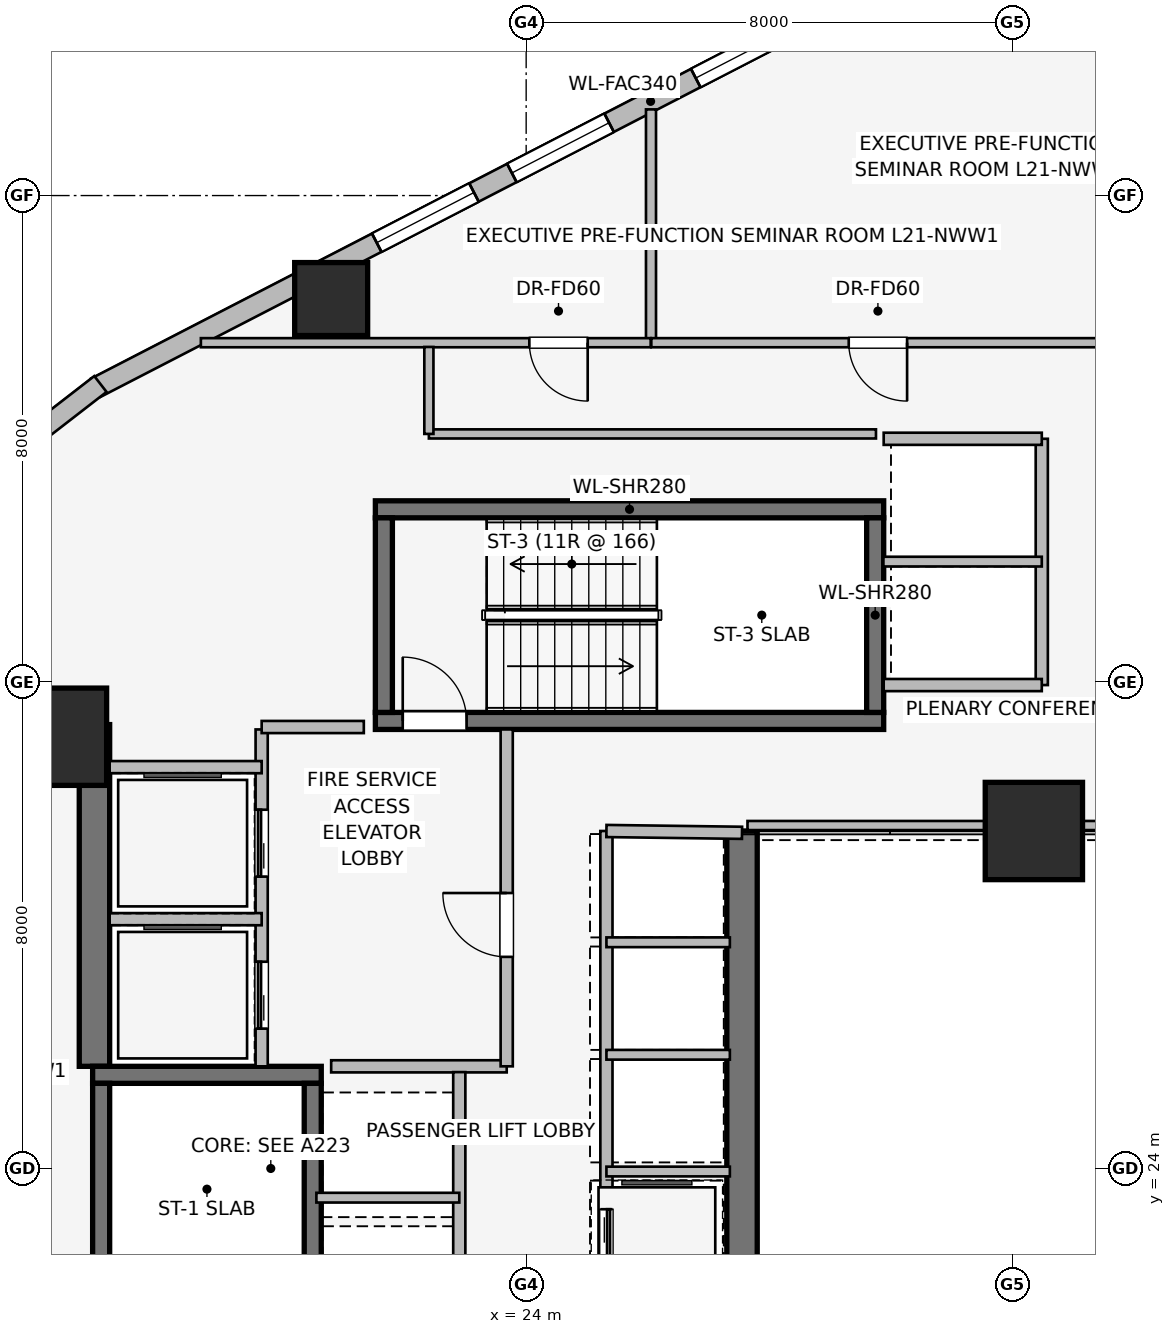
"""IFC4 building model, lengths in metres.
Left out: names, types, materials, properties, quantities, classifications, styles, units other than length and angle.
Written with IfcOpenShell. Run it as: python <this file> out.ifc"""

import sys

from ifc_helpers import new_model, si_unit, direction, frame, frame_2d, origin, origin_2d, place, context, subcontext, project, spatial, rectangle, extrude, element, fill, save


model = new_model("IFC4")
c1 = context("Model", 3, precision=1e-05, world=origin(), true_north=direction((0.0, 1.0)))
c2 = subcontext(c1, "Body", "Model", "MODEL_VIEW")
j1 = project(units=[si_unit("LENGTHUNIT", "METRE"), si_unit("PLANEANGLEUNIT", "RADIAN")], contexts=[c1])
p1 = place(None, origin())
s1 = spatial("IfcSite", under=j1, at=p1, CompositionType="ELEMENT")
p2 = place(p1, origin())
s2 = spatial("IfcBuilding", under=s1, at=p2, CompositionType="ELEMENT")
p3 = place(p2, frame((0.0, 0.0, 81.75)))
s3 = spatial("IfcBuildingStorey", under=s2, at=p3, CompositionType="ELEMENT", Elevation=81.75)
p4 = place(p3, frame((16.9, 25.68, 0.0), z_axis=(0.0, 0.0, 1.0), x_axis=(0.0, 1.0, 0.0)))
e1 = element("IfcWall", 1, at=p4, inside=s3, PredefinedType="SHEAR", context=c2, shape_type="SweptSolid", body=[
    extrude(rectangle(XDim=5.62, YDim=0.5, at=frame_2d((2.81, 0.0))), origin(), (0.0, 0.0, 1.0), 3.65),
])
p5 = place(p3, frame((27.55, 29.55, 0.0), z_axis=(0.0, 0.0, 1.0), x_axis=(0.0, -1.0, 0.0)))
e2 = element("IfcWall", 2, at=p5, inside=s3, PredefinedType="SHEAR", context=c2, shape_type="SweptSolid", body=[
    extrude(rectangle(XDim=11.25, YDim=0.5, at=frame_2d((5.625, 0.0))), origin(), (0.0, 0.0, 1.0), 3.65),
])
p6 = place(p3, frame((20.63, 25.54, 0.0), z_axis=(0.0, 0.0, 1.0), x_axis=(-1.0, 0.0, 0.0)))
e3 = element("IfcWall", 3, at=p6, inside=s3, PredefinedType="SHEAR", context=c2, shape_type="SweptSolid", body=[
    extrude(rectangle(XDim=3.76, YDim=0.28, at=frame_2d((1.88, 0.0))), origin(), (0.0, 0.0, 1.0), 3.65),
])
p7 = place(p3, frame((17.01, 25.4, 0.0), z_axis=(0.0, 0.0, 1.0), x_axis=(0.0, -1.0, 0.0)))
e4 = element("IfcWall", 4, at=p7, inside=s3, PredefinedType="SHEAR", context=c2, shape_type="SweptSolid", body=[
    extrude(rectangle(XDim=7.8, YDim=0.28, at=frame_2d((3.9, 0.0))), origin(), (0.0, 0.0, 1.0), 3.65),
])
p8 = place(p3, frame((20.49, 17.6, 0.0), z_axis=(0.0, 0.0, 1.0), x_axis=(0.0, 1.0, 0.0)))
e5 = element("IfcWall", 5, at=p8, inside=s3, PredefinedType="SHEAR", context=c2, shape_type="SweptSolid", body=[
    extrude(rectangle(XDim=7.8, YDim=0.28, at=frame_2d((3.9, 0.0))), origin(), (0.0, 0.0, 1.0), 3.65),
])
p9 = place(p8, frame((0.44, 0.0, 0.0)))
e6 = element("IfcOpeningElement", 6, at=p9, cuts=e5, PredefinedType="OPENING", context=c2, shape_type="SweptSolid", body=[
    extrude(rectangle(XDim=1.05, YDim=2.0, at=frame_2d((0.525, 1.0))), frame((0.0, 0.15, 0.0), z_axis=(0.0, -1.0, 0.0), x_axis=(1.0, 0.0, 0.0)), (0.0, 0.0, 1.0), 0.3),
])
p10 = place(p3, frame((21.52, 31.36, 0.0), z_axis=(0.0, 0.0, 1.0), x_axis=(1.0, 0.0, 0.0)))
e7 = element("IfcWall", 7, at=p10, inside=s3, PredefinedType="SHEAR", context=c2, shape_type="SweptSolid", body=[
    extrude(rectangle(XDim=8.36, YDim=0.28, at=frame_2d((4.18, 0.0))), origin(), (0.0, 0.0, 1.0), 3.65),
])
p11 = place(p10, frame((0.45, 0.0, 0.0)))
e8 = element("IfcOpeningElement", 8, at=p11, cuts=e7, PredefinedType="OPENING", context=c2, shape_type="SweptSolid", body=[
    extrude(rectangle(XDim=1.05, YDim=2.0, at=frame_2d((0.525, 1.0))), frame((0.0, 0.15, 0.0), z_axis=(0.0, -1.0, 0.0), x_axis=(1.0, 0.0, 0.0)), (0.0, 0.0, 1.0), 0.3),
])
p12 = place(p3, frame((29.88, 34.84, 0.0), z_axis=(0.0, 0.0, 1.0), x_axis=(-1.0, 0.0, 0.0)))
e9 = element("IfcWall", 9, at=p12, inside=s3, PredefinedType="SHEAR", context=c2, shape_type="SweptSolid", body=[
    extrude(rectangle(XDim=8.36, YDim=0.28, at=frame_2d((4.18, 0.0))), origin(), (0.0, 0.0, 1.0), 3.65),
])
for number, where, z_axis, x_axis in (
    (10, (21.66, 34.7, 0.0), (0.0, 0.0, 1.0), (0.0, -1.0, 0.0)),
    (11, (29.74, 31.5, 0.0), (0.0, 0.0, 1.0), (0.0, 1.0, 0.0)),
):
    element("IfcWall", number, at=place(p3, frame(where, z_axis=z_axis, x_axis=x_axis)), inside=s3, PredefinedType="SHEAR", context=c2, shape_type="SweptSolid", body=[
        extrude(rectangle(XDim=3.2, YDim=0.28, at=frame_2d((1.6, 0.0))), origin(), (0.0, 0.0, 1.0), 3.65),
    ])
for number, where, z_axis, x_axis in (
    (12, (16.3, 31.1, 0.0), (0.0, 0.0, 1.0), (1.0, 0.0, 0.0)),
    (13, (32.35, 29.55, 0.0), (0.0, 0.0, 1.0), (1.0, 0.0, 0.0)),
):
    element("IfcColumn", number, at=place(p3, frame(where, z_axis=z_axis, x_axis=x_axis)), inside=s3, PredefinedType="COLUMN", context=c2, shape_type="SweptSolid", body=[
        extrude(rectangle(XDim=1.6, YDim=1.6, at=origin_2d()), origin(), (0.0, 0.0, 1.0), 3.65),
    ])
p13 = place(p3, frame((20.793, 38.298, 0.0), z_axis=(0.0, 0.0, 1.0), x_axis=(1.0, 0.0, 0.0)))
e14 = element("IfcColumn", 14, at=p13, inside=s3, PredefinedType="COLUMN", context=c2, shape_type="SweptSolid", body=[
    extrude(rectangle(XDim=1.2, YDim=1.2, at=origin_2d()), origin(), (0.0, 0.0, 1.0), 3.65),
])
p14 = place(p3, frame((16.924, 36.841, 0.0), z_axis=(0.0, 0.0, 1.0), x_axis=(0.888634413993, 0.458616264721, 0.0)))
e15 = element("IfcWall", 15, at=p14, inside=s3, PredefinedType="STANDARD", context=c2, shape_type="SweptSolid", body=[
    extrude(rectangle(XDim=20.531, YDim=0.34, at=frame_2d((10.266, 0.0))), origin(), (0.0, 0.0, 1.0), 2.684),
])
p15 = place(p14, frame((5.197, 0.0, 0.75)))
e16 = element("IfcOpeningElement", 16, at=p15, cuts=e15, PredefinedType="OPENING", context=c2, shape_type="SweptSolid", body=[
    extrude(rectangle(XDim=1.8, YDim=1.5, at=frame_2d((0.9, 0.75))), frame((0.0, 0.18, 0.0), z_axis=(0.0, -1.0, 0.0), x_axis=(1.0, 0.0, 0.0)), (0.0, 0.0, 1.0), 0.36),
])
p16 = place(p14, frame((7.698, 0.0, 0.75)))
e17 = element("IfcOpeningElement", 17, at=p16, cuts=e15, PredefinedType="OPENING", context=c2, shape_type="SweptSolid", body=[
    extrude(rectangle(XDim=1.8, YDim=1.5, at=frame_2d((0.9, 0.75))), frame((0.0, 0.18, 0.0), z_axis=(0.0, -1.0, 0.0), x_axis=(1.0, 0.0, 0.0)), (0.0, 0.0, 1.0), 0.36),
])
p17 = place(p14, frame((11.101, 0.0, 0.75)))
e18 = element("IfcOpeningElement", 18, at=p17, cuts=e15, PredefinedType="OPENING", context=c2, shape_type="SweptSolid", body=[
    extrude(rectangle(XDim=1.5, YDim=1.5, at=frame_2d((0.75, 0.75))), frame((0.0, 0.18, 0.0), z_axis=(0.0, -1.0, 0.0), x_axis=(1.0, 0.0, 0.0)), (0.0, 0.0, 1.0), 0.36),
])
p18 = place(p14, frame((13.657, 0.0, 0.75)))
e19 = element("IfcOpeningElement", 19, at=p18, cuts=e15, PredefinedType="OPENING", context=c2, shape_type="SweptSolid", body=[
    extrude(rectangle(XDim=1.5, YDim=1.5, at=frame_2d((0.75, 0.75))), frame((0.0, 0.18, 0.0), z_axis=(0.0, -1.0, 0.0), x_axis=(1.0, 0.0, 0.0)), (0.0, 0.0, 1.0), 0.36),
])
p19 = place(p14, frame((17.476, 0.0, 0.75)))
e20 = element("IfcOpeningElement", 20, at=p19, cuts=e15, PredefinedType="OPENING", context=c2, shape_type="SweptSolid", body=[
    extrude(rectangle(XDim=1.05, YDim=1.4, at=frame_2d((0.525, 0.7))), frame((0.0, 0.18, 0.0), z_axis=(0.0, -1.0, 0.0), x_axis=(1.0, 0.0, 0.0)), (0.0, 0.0, 1.0), 0.36),
])
p20 = place(p3, frame((15.673, 35.875, 0.0), z_axis=(0.0, 0.0, 1.0), x_axis=(0.790691856293, 0.61221433207, 0.0)))
e21 = element("IfcWall", 21, at=p20, inside=s3, PredefinedType="STANDARD", context=c2, shape_type="SweptSolid", body=[
    extrude(rectangle(XDim=1.676, YDim=0.33, at=frame_2d((0.838, 0.0))), origin(), (0.0, 0.0, 1.0), 3.39),
])
p21 = place(p3, frame((19.65, 25.68, 0.0), z_axis=(0.0, 0.0, 1.0), x_axis=(0.0, 1.0, 0.0)))
e22 = element("IfcWall", 22, at=p21, inside=s3, PredefinedType="PARTITIONING", context=c2, shape_type="SweptSolid", body=[
    extrude(rectangle(XDim=5.54, YDim=0.2, at=frame_2d((2.77, 0.0))), origin(), (0.0, 0.0, 1.0), 3.39),
])
p22 = place(p21, frame((0.62, 0.0, 0.0)))
e23 = element("IfcOpeningElement", 23, at=p22, cuts=e22, PredefinedType="OPENING", context=c2, shape_type="SweptSolid", body=[
    extrude(rectangle(XDim=1.1, YDim=2.2, at=frame_2d((0.55, 1.1))), frame((0.0, 0.11, 0.0), z_axis=(0.0, -1.0, 0.0), x_axis=(1.0, 0.0, 0.0)), (0.0, 0.0, 1.0), 0.22),
])
p23 = place(p21, frame((3.12, 0.0, 0.0)))
e24 = element("IfcOpeningElement", 24, at=p23, cuts=e22, PredefinedType="OPENING", context=c2, shape_type="SweptSolid", body=[
    extrude(rectangle(XDim=1.1, YDim=2.2, at=frame_2d((0.55, 1.1))), frame((0.0, 0.11, 0.0), z_axis=(0.0, -1.0, 0.0), x_axis=(1.0, 0.0, 0.0)), (0.0, 0.0, 1.0), 0.22),
])
p24 = place(p3, frame((20.793, 25.68, 0.0), z_axis=(0.0, 0.0, 1.0), x_axis=(1.0, 0.0, 0.0)))
e25 = element("IfcWall", 25, at=p24, inside=s3, PredefinedType="PARTITIONING", context=c2, shape_type="SweptSolid", body=[
    extrude(rectangle(XDim=2.887, YDim=0.2, at=frame_2d((1.443, 0.0))), origin(), (0.0, 0.0, 1.0), 3.39),
])
p25 = place(p3, frame((23.68, 25.68, 0.0), z_axis=(0.0, 0.0, 1.0), x_axis=(0.0, 1.0, 0.0)))
e26 = element("IfcWall", 26, at=p25, inside=s3, PredefinedType="PARTITIONING", context=c2, shape_type="SweptSolid", body=[
    extrude(rectangle(XDim=5.54, YDim=0.2, at=frame_2d((2.77, 0.0))), origin(), (0.0, 0.0, 1.0), 3.39),
])
p26 = place(p25, frame((1.8, 0.0, 0.0)))
e27 = element("IfcOpeningElement", 27, at=p26, cuts=e26, PredefinedType="OPENING", context=c2, shape_type="SweptSolid", body=[
    extrude(rectangle(XDim=1.05, YDim=2.0, at=frame_2d((0.525, 1.0))), frame((0.0, 0.11, 0.0), z_axis=(0.0, -1.0, 0.0), x_axis=(1.0, 0.0, 0.0)), (0.0, 0.0, 1.0), 0.22),
])
p27 = place(p3, frame((21.33, 31.26, 0.0), z_axis=(0.0, 0.0, 1.0), x_axis=(-1.0, 0.0, 0.0)))
e28 = element("IfcWall", 28, at=p27, inside=s3, PredefinedType="PARTITIONING", context=c2, shape_type="SweptSolid", body=[
    extrude(rectangle(XDim=1.68, YDim=0.2, at=frame_2d((0.84, 0.0))), origin(), (0.0, 0.0, 1.0), 3.39),
])
p28 = place(p3, frame((17.15, 28.1, 0.0), z_axis=(0.0, 0.0, 1.0), x_axis=(1.0, 0.0, 0.0)))
e29 = element("IfcWall", 29, at=p28, inside=s3, PredefinedType="PARTITIONING", context=c2, shape_type="SweptSolid", body=[
    extrude(rectangle(XDim=2.5, YDim=0.2, at=frame_2d((1.25, 0.0))), origin(), (0.0, 0.0, 1.0), 3.39),
])
p29 = place(p3, frame((19.65, 30.6, 0.0), z_axis=(0.0, 0.0, 1.0), x_axis=(-1.0, 0.0, 0.0)))
e30 = element("IfcWall", 30, at=p29, inside=s3, PredefinedType="PARTITIONING", context=c2, shape_type="SweptSolid", body=[
    extrude(rectangle(XDim=2.5, YDim=0.2, at=frame_2d((1.25, 0.0))), origin(), (0.0, 0.0, 1.0), 2.29),
])
p30 = place(p3, frame((32.48, 31.95, 0.0), z_axis=(0.0, 0.0, 1.0), x_axis=(0.0, 1.0, 0.0)))
e31 = element("IfcWall", 31, at=p30, inside=s3, PredefinedType="PARTITIONING", context=c2, shape_type="SweptSolid", body=[
    extrude(rectangle(XDim=4.05, YDim=0.2, at=frame_2d((2.025, 0.0))), origin(), (0.0, 0.0, 1.0), 2.513),
])
for number, where, z_axis, x_axis in (
    (32, (29.88, 36.0, 0.0), (0.0, 0.0, 1.0), (1.0, 0.0, 0.0)),
    (33, (32.48, 31.95, 0.0), (0.0, 0.0, 1.0), (-1.0, 0.0, 0.0)),
):
    element("IfcWall", number, at=place(p3, frame(where, z_axis=z_axis, x_axis=x_axis)), inside=s3, PredefinedType="PARTITIONING", context=c2, shape_type="SweptSolid", body=[
        extrude(rectangle(XDim=2.6, YDim=0.2, at=frame_2d((1.3, 0.0))), origin(), (0.0, 0.0, 1.0), 3.39),
    ])
p31 = place(p3, frame((29.875, 33.98, 0.0), z_axis=(0.0, 0.0, 1.0), x_axis=(1.0, 0.0, 0.0)))
e34 = element("IfcWall", 34, at=p31, inside=s3, PredefinedType="PARTITIONING", context=c2, shape_type="SweptSolid", body=[
    extrude(rectangle(XDim=2.605, YDim=0.16, at=frame_2d((1.302, 0.0))), origin(), (0.0, 0.0, 1.0), 3.39),
])
p32 = place(p3, frame((22.9, 19.5, 0.0), z_axis=(0.0, 0.0, 1.0), x_axis=(0.0, 1.0, 0.0)))
e35 = element("IfcWall", 35, at=p32, inside=s3, PredefinedType="PARTITIONING", context=c2, shape_type="SweptSolid", body=[
    extrude(rectangle(XDim=6.085, YDim=0.2, at=frame_2d((3.042, 0.0))), origin(), (0.0, 0.0, 1.0), 3.39),
])
p33 = place(p3, frame((20.55, 23.52, 0.0), z_axis=(0.0, 0.0, 1.0), x_axis=(1.0, 0.0, 0.0)))
e36 = element("IfcWall", 36, at=p33, inside=s3, PredefinedType="PARTITIONING", context=c2, shape_type="SweptSolid", body=[
    extrude(rectangle(XDim=2.35, YDim=0.16, at=frame_2d((1.175, 0.0))), origin(), (0.0, 0.0, 1.0), 3.39),
])
p34 = place(p3, frame((25.32, 29.55, 0.0), z_axis=(0.0, 0.0, 1.0), x_axis=(0.0, -1.0, 0.0)))
e37 = element("IfcWall", 37, at=p34, inside=s3, PredefinedType="PARTITIONING", context=c2, shape_type="SweptSolid", body=[
    extrude(rectangle(XDim=11.19, YDim=0.2, at=frame_2d((5.595, 0.0))), origin(), (0.0, 0.0, 1.0), 3.39),
])
p35 = place(p34, frame((6.22, 0.0, 0.0)))
e38 = element("IfcOpeningElement", 38, at=p35, cuts=e37, PredefinedType="OPENING", context=c2, shape_type="SweptSolid", body=[
    extrude(rectangle(XDim=1.1, YDim=2.2, at=frame_2d((0.55, 1.1))), frame((0.0, 0.11, 0.0), z_axis=(0.0, -1.0, 0.0), x_axis=(1.0, 0.0, 0.0)), (0.0, 0.0, 1.0), 0.22),
])
p36 = place(p34, frame((8.07, 0.0, 0.0)))
e39 = element("IfcOpeningElement", 39, at=p36, cuts=e37, PredefinedType="OPENING", context=c2, shape_type="SweptSolid", body=[
    extrude(rectangle(XDim=1.1, YDim=2.2, at=frame_2d((0.55, 1.1))), frame((0.0, 0.11, 0.0), z_axis=(0.0, -1.0, 0.0), x_axis=(1.0, 0.0, 0.0)), (0.0, 0.0, 1.0), 0.22),
])
p37 = place(p34, frame((9.73, 0.0, 0.0)))
e40 = element("IfcOpeningElement", 40, at=p37, cuts=e37, PredefinedType="OPENING", context=c2, shape_type="SweptSolid", body=[
    extrude(rectangle(XDim=1.1, YDim=2.2, at=frame_2d((0.55, 1.1))), frame((0.0, 0.11, 0.0), z_axis=(0.0, -1.0, 0.0), x_axis=(1.0, 0.0, 0.0)), (0.0, 0.0, 1.0), 0.22),
])
p38 = place(p3, frame((27.55, 29.52, 0.0), z_axis=(0.0, 0.0, 1.0), x_axis=(-0.999909343457, 0.013464949556, 0.0)))
e41 = element("IfcWall", 41, at=p38, inside=s3, PredefinedType="PARTITIONING", context=c2, shape_type="SweptSolid", body=[
    extrude(rectangle(XDim=2.23, YDim=0.2, at=frame_2d((1.115, 0.0))), origin(), (0.0, 0.0, 1.0), 2.29),
])
for number, where, z_axis, x_axis in (
    (42, (25.32, 23.95, 0.0), (0.0, 0.0, 1.0), (1.0, 0.0, 0.0)),
    (43, (25.32, 25.87, 0.0), (0.0, 0.0, 1.0), (1.0, 0.0, 0.0)),
    (44, (25.32, 27.72, 0.0), (0.0, 0.0, 1.0), (1.0, 0.0, 0.0)),
):
    element("IfcWall", number, at=place(p3, frame(where, z_axis=z_axis, x_axis=x_axis)), inside=s3, PredefinedType="PARTITIONING", context=c2, shape_type="SweptSolid", body=[
        extrude(rectangle(XDim=2.03, YDim=0.16, at=frame_2d((1.015, 0.0))), origin(), (0.0, 0.0, 1.0), 3.39),
    ])
p39 = place(p3, frame((39.84, 29.64, 0.0), z_axis=(0.0, 0.0, 1.0), x_axis=(-1.0, 0.0, 0.0)))
e45 = element("IfcWall", 45, at=p39, inside=s3, PredefinedType="PARTITIONING", context=c2, shape_type="SweptSolid", body=[
    extrude(rectangle(XDim=12.2, YDim=0.15, at=frame_2d((6.1, 0.0))), origin(), (0.0, 0.0, 1.0), 2.531),
])
p40 = place(p3, frame((26.053, 37.61, 0.0), z_axis=(0.0, 0.0, 1.0), x_axis=(0.0, 1.0, 0.0)))
e46 = element("IfcWall", 46, at=p40, inside=s3, PredefinedType="PARTITIONING", context=c2, shape_type="SweptSolid", body=[
    extrude(rectangle(XDim=3.807, YDim=0.165, at=frame_2d((1.903, 0.0))), origin(), (0.0, 0.0, 1.0), 3.39),
])
p41 = place(p3, frame((26.048, 37.58, 0.0), z_axis=(0.0, 0.0, 1.0), x_axis=(-1.0, 0.0, 0.0)))
e47 = element("IfcWall", 47, at=p41, inside=s3, PredefinedType="PARTITIONING", context=c2, shape_type="SweptSolid", body=[
    extrude(rectangle(XDim=7.398, YDim=0.15, at=frame_2d((3.699, 0.0))), origin(), (0.0, 0.0, 1.0), 3.39),
])
p42 = place(p41, frame((1.036, 0.0, 0.0)))
e48 = element("IfcOpeningElement", 48, at=p42, cuts=e47, PredefinedType="OPENING", context=c2, shape_type="SweptSolid", body=[
    extrude(rectangle(XDim=0.96, YDim=2.0, at=frame_2d((0.48, 1.0))), frame((0.0, 0.085, 0.0), z_axis=(0.0, -1.0, 0.0), x_axis=(1.0, 0.0, 0.0)), (0.0, 0.0, 1.0), 0.17),
])
p43 = place(p3, frame((33.962, 37.58, 0.0), z_axis=(0.0, 0.0, 1.0), x_axis=(-1.0, 0.0, 0.0)))
e49 = element("IfcWall", 49, at=p43, inside=s3, PredefinedType="PARTITIONING", context=c2, shape_type="SweptSolid", body=[
    extrude(rectangle(XDim=7.904, YDim=0.15, at=frame_2d((3.952, 0.0))), origin(), (0.0, 0.0, 1.0), 3.39),
])
p44 = place(p43, frame((3.697, 0.0, 0.0)))
e50 = element("IfcOpeningElement", 50, at=p44, cuts=e49, PredefinedType="OPENING", context=c2, shape_type="SweptSolid", body=[
    extrude(rectangle(XDim=0.96, YDim=2.0, at=frame_2d((0.48, 1.0))), frame((0.0, 0.085, 0.0), z_axis=(0.0, -1.0, 0.0), x_axis=(1.0, 0.0, 0.0)), (0.0, 0.0, 1.0), 0.17),
])
p45 = place(p3, frame((29.753, 36.08, 0.0), z_axis=(0.0, 0.0, 1.0), x_axis=(-1.0, 0.0, 0.0)))
e51 = element("IfcWall", 51, at=p45, inside=s3, PredefinedType="PARTITIONING", context=c2, shape_type="SweptSolid", body=[
    extrude(rectangle(XDim=7.353, YDim=0.15, at=frame_2d((3.677, 0.0))), origin(), (0.0, 0.0, 1.0), 3.39),
])
p46 = place(p3, frame((22.4, 36.08, 0.0), z_axis=(0.0, 0.0, 1.0), x_axis=(0.0, 1.0, 0.0)))
e52 = element("IfcWall", 52, at=p46, inside=s3, PredefinedType="PARTITIONING", context=c2, shape_type="SweptSolid", body=[
    extrude(rectangle(XDim=1.43, YDim=0.15, at=frame_2d((0.715, 0.0))), origin(), (0.0, 0.0, 1.0), 3.39),
])
p47 = place(p15, origin())
e53 = element("IfcWindow", 53, at=p47, inside=s3, PartitioningType="SINGLE_PANEL", PredefinedType="WINDOW", context=c2, shape_type="SweptSolid", body=[
    extrude(rectangle(XDim=1.8, YDim=1.5, at=frame_2d((0.9, 0.75))), frame((0.0, 0.03, 0.0), z_axis=(0.0, -1.0, 0.0), x_axis=(1.0, 0.0, 0.0)), (0.0, 0.0, 1.0), 0.06),
])
fill(e16, e53)
p48 = place(p16, origin())
e54 = element("IfcWindow", 54, at=p48, inside=s3, PartitioningType="SINGLE_PANEL", PredefinedType="WINDOW", context=c2, shape_type="SweptSolid", body=[
    extrude(rectangle(XDim=1.8, YDim=1.5, at=frame_2d((0.9, 0.75))), frame((0.0, 0.03, 0.0), z_axis=(0.0, -1.0, 0.0), x_axis=(1.0, 0.0, 0.0)), (0.0, 0.0, 1.0), 0.06),
])
fill(e17, e54)
p49 = place(p17, origin())
e55 = element("IfcWindow", 55, at=p49, inside=s3, PartitioningType="SINGLE_PANEL", PredefinedType="WINDOW", context=c2, shape_type="SweptSolid", body=[
    extrude(rectangle(XDim=1.5, YDim=1.5, at=frame_2d((0.75, 0.75))), frame((0.0, 0.03, 0.0), z_axis=(0.0, -1.0, 0.0), x_axis=(1.0, 0.0, 0.0)), (0.0, 0.0, 1.0), 0.06),
])
fill(e18, e55)
p50 = place(p11, origin())
e56 = element("IfcDoor", 56, at=p50, inside=s3, OperationType="SINGLE_SWING_LEFT", PredefinedType="DOOR", context=c2, shape_type="SweptSolid", body=[
    extrude(rectangle(XDim=1.05, YDim=2.0, at=frame_2d((0.525, 1.0))), frame((0.0, 0.025, 0.0), z_axis=(0.0, -1.0, 0.0), x_axis=(1.0, 0.0, 0.0)), (0.0, 0.0, 1.0), 0.05),
])
fill(e8, e56)
p51 = place(p22, origin())
e57 = element("IfcDoor", 57, at=p51, inside=s3, OperationType="SLIDING_TO_LEFT", PredefinedType="DOOR", context=c2, shape_type="SweptSolid", body=[
    extrude(rectangle(XDim=1.1, YDim=2.2, at=frame_2d((0.55, 1.1))), frame((0.0, 0.025, 0.0), z_axis=(0.0, -1.0, 0.0), x_axis=(1.0, 0.0, 0.0)), (0.0, 0.0, 1.0), 0.05),
])
fill(e23, e57)
p52 = place(p23, origin())
e58 = element("IfcDoor", 58, at=p52, inside=s3, OperationType="SLIDING_TO_LEFT", PredefinedType="DOOR", context=c2, shape_type="SweptSolid", body=[
    extrude(rectangle(XDim=1.1, YDim=2.2, at=frame_2d((0.55, 1.1))), frame((0.0, 0.025, 0.0), z_axis=(0.0, -1.0, 0.0), x_axis=(1.0, 0.0, 0.0)), (0.0, 0.0, 1.0), 0.05),
])
fill(e24, e58)
p53 = place(p26, origin())
e59 = element("IfcDoor", 59, at=p53, inside=s3, OperationType="SINGLE_SWING_RIGHT", PredefinedType="DOOR", context=c2, shape_type="SweptSolid", body=[
    extrude(rectangle(XDim=1.05, YDim=2.0, at=frame_2d((0.525, 1.0))), frame((0.0, 0.025, 0.0), z_axis=(0.0, -1.0, 0.0), x_axis=(1.0, 0.0, 0.0)), (0.0, 0.0, 1.0), 0.05),
])
fill(e27, e59)
p54 = place(p35, origin())
e60 = element("IfcDoor", 60, at=p54, inside=s3, OperationType="SLIDING_TO_LEFT", PredefinedType="DOOR", context=c2, shape_type="SweptSolid", body=[
    extrude(rectangle(XDim=1.1, YDim=2.2, at=frame_2d((0.55, 1.1))), frame((0.0, 0.025, 0.0), z_axis=(0.0, -1.0, 0.0), x_axis=(1.0, 0.0, 0.0)), (0.0, 0.0, 1.0), 0.05),
])
fill(e38, e60)
p55 = place(p42, origin())
e61 = element("IfcDoor", 61, at=p55, inside=s3, OperationType="SINGLE_SWING_LEFT", PredefinedType="DOOR", context=c2, shape_type="SweptSolid", body=[
    extrude(rectangle(XDim=0.96, YDim=2.0, at=frame_2d((0.48, 1.0))), frame((0.0, 0.025, 0.0), z_axis=(0.0, -1.0, 0.0), x_axis=(1.0, 0.0, 0.0)), (0.0, 0.0, 1.0), 0.05),
])
fill(e48, e61)
p56 = place(p44, origin())
e62 = element("IfcDoor", 62, at=p56, inside=s3, OperationType="SINGLE_SWING_LEFT", PredefinedType="DOOR", context=c2, shape_type="SweptSolid", body=[
    extrude(rectangle(XDim=0.96, YDim=2.0, at=frame_2d((0.48, 1.0))), frame((0.0, 0.025, 0.0), z_axis=(0.0, -1.0, 0.0), x_axis=(1.0, 0.0, 0.0)), (0.0, 0.0, 1.0), 0.05),
])
fill(e50, e62)
save(model, sys.argv[1])
